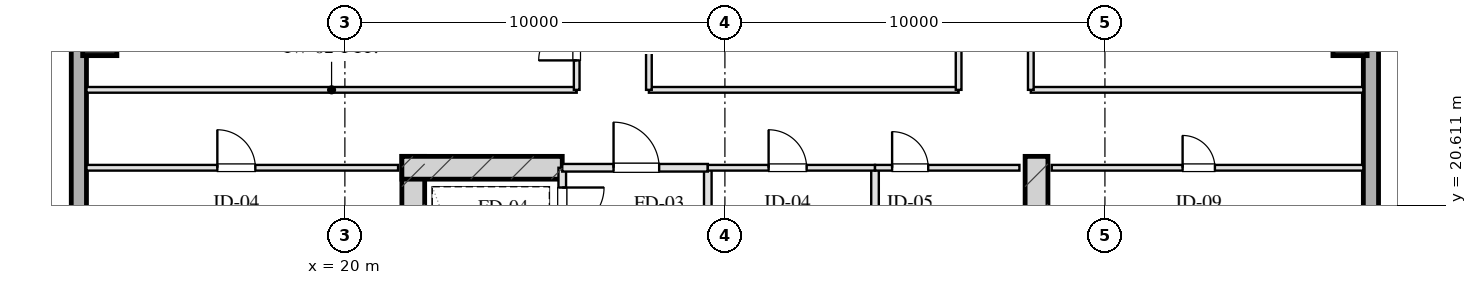
"""IFC4 building model, lengths in metres.
Left out: names, types, materials, properties, quantities, classifications, styles, units other than length and angle.
Written with IfcOpenShell. Run it as: python <this file> out.ifc"""

import sys

from ifc_helpers import new_model, si_unit, direction, frame, frame_2d, origin, origin_2d, place, context, subcontext, project, spatial, rectangle, hollow_rectangle, extrude, element, fill, save


model = new_model("IFC4")
c1 = context("Model", 3, precision=1e-05, world=origin(), true_north=direction((0.0, 1.0)))
c2 = subcontext(c1, "Body", "Model", "MODEL_VIEW")
j1 = project(units=[si_unit("LENGTHUNIT", "METRE"), si_unit("PLANEANGLEUNIT", "RADIAN")], contexts=[c1])
p1 = place(None, origin())
s1 = spatial("IfcSite", under=j1, at=p1, CompositionType="ELEMENT")
p2 = place(p1, origin())
s2 = spatial("IfcBuilding", under=s1, at=p2, CompositionType="ELEMENT")
p3 = place(p2, frame((0.0, 0.0, 180.55)))
s3 = spatial("IfcBuildingStorey", under=s2, at=p3, CompositionType="ELEMENT", Elevation=180.55)
for number, where, z_axis, x_axis in (
    (1, (21.8, 21.9, 0.0), (0.0, 0.0, 1.0), (0.0, -1.0, 0.0)),
    (2, (38.2, 21.9, 0.0), (0.0, 0.0, 1.0), (0.0, -1.0, 0.0)),
):
    element("IfcWall", number, at=place(p3, frame(where, z_axis=z_axis, x_axis=x_axis)), inside=s3, PredefinedType="SHEAR", context=c2, shape_type="SweptSolid", body=[
        extrude(rectangle(XDim=9.48, YDim=0.6, at=frame_2d((4.74, 0.0))), origin(), (0.0, 0.0, 1.0), 3.45),
    ])
p4 = place(p3, frame((21.5, 21.6, 0.0), z_axis=(0.0, 0.0, 1.0), x_axis=(1.0, 0.0, 0.0)))
e3 = element("IfcWall", 3, at=p4, inside=s3, PredefinedType="SHEAR", context=c2, shape_type="SweptSolid", body=[
    extrude(rectangle(XDim=4.22, YDim=0.6, at=frame_2d((2.11, 0.0))), origin(), (0.0, 0.0, 1.0), 3.45),
])
for number, where, z_axis, x_axis in (
    (4, (13.55, 25.0, 0.0), (0.0, 0.0, 1.0), (1.0, 0.0, 0.0)),
    (5, (46.45, 25.0, 0.0), (0.0, 0.0, 1.0), (1.0, 0.0, 0.0)),
):
    element("IfcColumn", number, at=place(p3, frame(where, z_axis=z_axis, x_axis=x_axis)), inside=s3, PredefinedType="COLUMN", context=c2, shape_type="SweptSolid", body=[
        extrude(hollow_rectangle(XDim=0.9, YDim=0.9, WallThickness=0.032, at=origin_2d()), origin(), (0.0, 0.0, 1.0), 3.451),
    ])
p5 = place(p3, frame((13.0, 10.8, 0.0), z_axis=(0.0, 0.0, 1.0), x_axis=(0.0, 1.0, 0.0)))
e6 = element("IfcWall", 6, at=p5, inside=s3, PredefinedType="SOLIDWALL", context=c2, shape_type="SweptSolid", body=[
    extrude(rectangle(XDim=46.4, YDim=0.4, at=frame_2d((23.2, 0.0))), origin(), (0.0, 0.0, 1.0), 2.55),
])
p6 = place(p5, frame((15.75, 0.0, 0.75)))
e7 = element("IfcOpeningElement", 7, at=p6, cuts=e6, PredefinedType="OPENING", context=c2, shape_type="SweptSolid", body=[
    extrude(rectangle(XDim=2.1, YDim=1.4, at=frame_2d((1.05, 0.7))), frame((0.0, 0.21, 0.0), z_axis=(0.0, -1.0, 0.0), x_axis=(1.0, 0.0, 0.0)), (0.0, 0.0, 1.0), 0.42),
])
p7 = place(p5, frame((19.55, 0.0, 0.75)))
e8 = element("IfcOpeningElement", 8, at=p7, cuts=e6, PredefinedType="OPENING", context=c2, shape_type="SweptSolid", body=[
    extrude(rectangle(XDim=2.1, YDim=1.4, at=frame_2d((1.05, 0.7))), frame((0.0, 0.21, 0.0), z_axis=(0.0, -1.0, 0.0), x_axis=(1.0, 0.0, 0.0)), (0.0, 0.0, 1.0), 0.42),
])
p8 = place(p5, frame((24.75, 0.0, 0.75)))
e9 = element("IfcOpeningElement", 9, at=p8, cuts=e6, PredefinedType="OPENING", context=c2, shape_type="SweptSolid", body=[
    extrude(rectangle(XDim=2.1, YDim=1.4, at=frame_2d((1.05, 0.7))), frame((0.0, 0.21, 0.0), z_axis=(0.0, -1.0, 0.0), x_axis=(1.0, 0.0, 0.0)), (0.0, 0.0, 1.0), 0.42),
])
p9 = place(p5, frame((28.55, 0.0, 0.75)))
e10 = element("IfcOpeningElement", 10, at=p9, cuts=e6, PredefinedType="OPENING", context=c2, shape_type="SweptSolid", body=[
    extrude(rectangle(XDim=2.1, YDim=1.4, at=frame_2d((1.05, 0.7))), frame((0.0, 0.21, 0.0), z_axis=(0.0, -1.0, 0.0), x_axis=(1.0, 0.0, 0.0)), (0.0, 0.0, 1.0), 0.42),
])
p10 = place(p3, frame((47.0, 57.2, 0.0), z_axis=(0.0, 0.0, 1.0), x_axis=(0.0, -1.0, 0.0)))
e11 = element("IfcWall", 11, at=p10, inside=s3, PredefinedType="SOLIDWALL", context=c2, shape_type="SweptSolid", body=[
    extrude(rectangle(XDim=46.4, YDim=0.4, at=frame_2d((23.2, 0.0))), origin(), (0.0, 0.0, 1.0), 2.55),
])
p11 = place(p10, frame((28.55, 0.0, 0.75)))
e12 = element("IfcOpeningElement", 12, at=p11, cuts=e11, PredefinedType="OPENING", context=c2, shape_type="SweptSolid", body=[
    extrude(rectangle(XDim=2.1, YDim=1.4, at=frame_2d((1.05, 0.7))), frame((0.0, 0.21, 0.0), z_axis=(0.0, -1.0, 0.0), x_axis=(1.0, 0.0, 0.0)), (0.0, 0.0, 1.0), 0.42),
])
p12 = place(p10, frame((24.75, 0.0, 0.75)))
e13 = element("IfcOpeningElement", 13, at=p12, cuts=e11, PredefinedType="OPENING", context=c2, shape_type="SweptSolid", body=[
    extrude(rectangle(XDim=2.1, YDim=1.4, at=frame_2d((1.05, 0.7))), frame((0.0, 0.21, 0.0), z_axis=(0.0, -1.0, 0.0), x_axis=(1.0, 0.0, 0.0)), (0.0, 0.0, 1.0), 0.42),
])
p13 = place(p10, frame((19.55, 0.0, 0.75)))
e14 = element("IfcOpeningElement", 14, at=p13, cuts=e11, PredefinedType="OPENING", context=c2, shape_type="SweptSolid", body=[
    extrude(rectangle(XDim=2.1, YDim=1.4, at=frame_2d((1.05, 0.7))), frame((0.0, 0.21, 0.0), z_axis=(0.0, -1.0, 0.0), x_axis=(1.0, 0.0, 0.0)), (0.0, 0.0, 1.0), 0.42),
])
p14 = place(p10, frame((15.75, 0.0, 0.75)))
e15 = element("IfcOpeningElement", 15, at=p14, cuts=e11, PredefinedType="OPENING", context=c2, shape_type="SweptSolid", body=[
    extrude(rectangle(XDim=2.1, YDim=1.4, at=frame_2d((1.05, 0.7))), frame((0.0, 0.21, 0.0), z_axis=(0.0, -1.0, 0.0), x_axis=(1.0, 0.0, 0.0)), (0.0, 0.0, 1.0), 0.42),
])
p15 = place(p3, frame((25.72, 21.6, 0.0), z_axis=(0.0, 0.0, 1.0), x_axis=(0.0, -1.0, 0.0)))
e16 = element("IfcWall", 16, at=p15, inside=s3, PredefinedType="PARTITIONING", context=c2, shape_type="SweptSolid", body=[
    extrude(rectangle(XDim=1.9, YDim=0.2, at=frame_2d((0.95, 0.0))), origin(), (0.0, 0.0, 1.0), 3.155),
])
p16 = place(p15, frame((0.52, 0.0, 0.0)))
e17 = element("IfcOpeningElement", 17, at=p16, cuts=e16, PredefinedType="OPENING", context=c2, shape_type="SweptSolid", body=[
    extrude(rectangle(XDim=1.1, YDim=2.05, at=frame_2d((0.55, 1.025))), frame((0.0, 0.11, 0.0), z_axis=(0.0, -1.0, 0.0), x_axis=(1.0, 0.0, 0.0)), (0.0, 0.0, 1.0), 0.22),
])
p17 = place(p3, frame((29.55, 21.6, 0.0), z_axis=(0.0, 0.0, 1.0), x_axis=(0.0, -1.0, 0.0)))
e18 = element("IfcWall", 18, at=p17, inside=s3, PredefinedType="PARTITIONING", context=c2, shape_type="SweptSolid", body=[
    extrude(rectangle(XDim=8.43, YDim=0.2, at=frame_2d((4.215, 0.0))), origin(), (0.0, 0.0, 1.0), 3.155),
])
p18 = place(p3, frame((25.72, 21.6, 0.0), z_axis=(0.0, 0.0, 1.0), x_axis=(1.0, 0.0, 0.0)))
e19 = element("IfcWall", 19, at=p18, inside=s3, PredefinedType="PARTITIONING", context=c2, shape_type="SweptSolid", body=[
    extrude(rectangle(XDim=3.83, YDim=0.2, at=frame_2d((1.915, 0.0))), origin(), (0.0, 0.0, 1.0), 3.155),
])
p19 = place(p18, frame((1.35, 0.0, 0.0)))
e20 = element("IfcOpeningElement", 20, at=p19, cuts=e19, PredefinedType="OPENING", context=c2, shape_type="SweptSolid", body=[
    extrude(rectangle(XDim=1.2, YDim=2.05, at=frame_2d((0.6, 1.025))), frame((0.0, 0.11, 0.0), z_axis=(0.0, -1.0, 0.0), x_axis=(1.0, 0.0, 0.0)), (0.0, 0.0, 1.0), 0.22),
])
p20 = place(p3, frame((33.95, 21.6, 0.0), z_axis=(0.0, 0.0, 1.0), x_axis=(0.0, -1.0, 0.0)))
e21 = element("IfcWall", 21, at=p20, inside=s3, PredefinedType="PARTITIONING", context=c2, shape_type="SweptSolid", body=[
    extrude(rectangle(XDim=8.43, YDim=0.2, at=frame_2d((4.215, 0.0))), origin(), (0.0, 0.0, 1.0), 3.155),
])
p21 = place(p3, frame((29.55, 21.6, 0.0), z_axis=(0.0, 0.0, 1.0), x_axis=(1.0, 0.0, 0.0)))
e22 = element("IfcWall", 22, at=p21, inside=s3, PredefinedType="PARTITIONING", context=c2, shape_type="SweptSolid", body=[
    extrude(rectangle(XDim=4.4, YDim=0.15, at=frame_2d((2.2, 0.0))), origin(), (0.0, 0.0, 1.0), 3.155),
])
p22 = place(p21, frame((1.6, 0.0, 0.0)))
e23 = element("IfcOpeningElement", 23, at=p22, cuts=e22, PredefinedType="OPENING", context=c2, shape_type="SweptSolid", body=[
    extrude(rectangle(XDim=1.0, YDim=2.05, at=frame_2d((0.5, 1.025))), frame((0.0, 0.085, 0.0), z_axis=(0.0, -1.0, 0.0), x_axis=(1.0, 0.0, 0.0)), (0.0, 0.0, 1.0), 0.17),
])
p23 = place(p3, frame((33.95, 21.6, 0.0), z_axis=(0.0, 0.0, 1.0), x_axis=(1.0, 0.0, 0.0)))
e24 = element("IfcWall", 24, at=p23, inside=s3, PredefinedType="PARTITIONING", context=c2, shape_type="SweptSolid", body=[
    extrude(rectangle(XDim=3.8, YDim=0.15, at=frame_2d((1.9, 0.0))), origin(), (0.0, 0.0, 1.0), 3.155),
])
p24 = place(p23, frame((0.45, 0.0, 0.0)))
e25 = element("IfcOpeningElement", 25, at=p24, cuts=e24, PredefinedType="OPENING", context=c2, shape_type="SweptSolid", body=[
    extrude(rectangle(XDim=0.95, YDim=2.05, at=frame_2d((0.475, 1.025))), frame((0.0, 0.085, 0.0), z_axis=(0.0, -1.0, 0.0), x_axis=(1.0, 0.0, 0.0)), (0.0, 0.0, 1.0), 0.17),
])
p25 = place(p3, frame((13.2, 21.6, 0.0), z_axis=(0.0, 0.0, 1.0), x_axis=(1.0, 0.0, 0.0)))
e26 = element("IfcWall", 26, at=p25, inside=s3, PredefinedType="PARTITIONING", context=c2, shape_type="SweptSolid", body=[
    extrude(rectangle(XDim=8.2, YDim=0.15, at=frame_2d((4.1, 0.0))), origin(), (0.0, 0.0, 1.0), 3.155),
])
p26 = place(p25, frame((3.444, 0.0, 0.0)))
e27 = element("IfcOpeningElement", 27, at=p26, cuts=e26, PredefinedType="OPENING", context=c2, shape_type="SweptSolid", body=[
    extrude(rectangle(XDim=1.0, YDim=2.05, at=frame_2d((0.5, 1.025))), frame((0.0, 0.085, 0.0), z_axis=(0.0, -1.0, 0.0), x_axis=(1.0, 0.0, 0.0)), (0.0, 0.0, 1.0), 0.17),
])
p27 = place(p3, frame((38.6, 21.6, 0.0), z_axis=(0.0, 0.0, 1.0), x_axis=(1.0, 0.0, 0.0)))
e28 = element("IfcWall", 28, at=p27, inside=s3, PredefinedType="PARTITIONING", context=c2, shape_type="SweptSolid", body=[
    extrude(rectangle(XDim=8.2, YDim=0.15, at=frame_2d((4.1, 0.0))), origin(), (0.0, 0.0, 1.0), 3.155),
])
p28 = place(p27, frame((3.444, 0.0, 0.0)))
e29 = element("IfcOpeningElement", 29, at=p28, cuts=e28, PredefinedType="OPENING", context=c2, shape_type="SweptSolid", body=[
    extrude(rectangle(XDim=0.85, YDim=2.05, at=frame_2d((0.425, 1.025))), frame((0.0, 0.085, 0.0), z_axis=(0.0, -1.0, 0.0), x_axis=(1.0, 0.0, 0.0)), (0.0, 0.0, 1.0), 0.17),
])
p29 = place(p3, frame((13.2, 23.65, 0.0), z_axis=(0.0, 0.0, 1.0), x_axis=(1.0, 0.0, 0.0)))
e30 = element("IfcWall", 30, at=p29, inside=s3, PredefinedType="PARTITIONING", context=c2, shape_type="SweptSolid", body=[
    extrude(rectangle(XDim=12.9, YDim=0.15, at=frame_2d((6.45, 0.0))), origin(), (0.0, 0.0, 1.0), 3.155),
])
p30 = place(p3, frame((28.0, 23.65, 0.0), z_axis=(0.0, 0.0, 1.0), x_axis=(1.0, 0.0, 0.0)))
e31 = element("IfcWall", 31, at=p30, inside=s3, PredefinedType="PARTITIONING", context=c2, shape_type="SweptSolid", body=[
    extrude(rectangle(XDim=8.15, YDim=0.15, at=frame_2d((4.075, 0.0))), origin(), (0.0, 0.0, 1.0), 3.155),
])
p31 = place(p3, frame((38.05, 23.65, 0.0), z_axis=(0.0, 0.0, 1.0), x_axis=(1.0, 0.0, 0.0)))
e32 = element("IfcWall", 32, at=p31, inside=s3, PredefinedType="PARTITIONING", context=c2, shape_type="SweptSolid", body=[
    extrude(rectangle(XDim=8.75, YDim=0.15, at=frame_2d((4.375, 0.0))), origin(), (0.0, 0.0, 1.0), 3.155),
])
p32 = place(p3, frame((26.1, 23.65, 0.0), z_axis=(0.0, 0.0, 1.0), x_axis=(0.0, 1.0, 0.0)))
e33 = element("IfcWall", 33, at=p32, inside=s3, PredefinedType="PARTITIONING", context=c2, shape_type="SweptSolid", body=[
    extrude(rectangle(XDim=20.7, YDim=0.15, at=frame_2d((10.35, 0.0))), origin(), (0.0, 0.0, 1.0), 3.155),
])
p33 = place(p32, frame((0.775, 0.0, 0.0)))
e34 = element("IfcOpeningElement", 34, at=p33, cuts=e33, PredefinedType="OPENING", context=c2, shape_type="SweptSolid", body=[
    extrude(rectangle(XDim=1.0, YDim=2.05, at=frame_2d((0.5, 1.025))), frame((0.0, 0.085, 0.0), z_axis=(0.0, -1.0, 0.0), x_axis=(1.0, 0.0, 0.0)), (0.0, 0.0, 1.0), 0.17),
])
p34 = place(p32, frame((3.95, 0.0, 0.0)))
e35 = element("IfcOpeningElement", 35, at=p34, cuts=e33, PredefinedType="OPENING", context=c2, shape_type="SweptSolid", body=[
    extrude(rectangle(XDim=1.0, YDim=2.05, at=frame_2d((0.5, 1.025))), frame((0.0, 0.085, 0.0), z_axis=(0.0, -1.0, 0.0), x_axis=(1.0, 0.0, 0.0)), (0.0, 0.0, 1.0), 0.17),
])
p35 = place(p32, frame((7.51, 0.0, 0.0)))
e36 = element("IfcOpeningElement", 36, at=p35, cuts=e33, PredefinedType="OPENING", context=c2, shape_type="SweptSolid", body=[
    extrude(rectangle(XDim=1.05, YDim=2.05, at=frame_2d((0.525, 1.025))), frame((0.0, 0.085, 0.0), z_axis=(0.0, -1.0, 0.0), x_axis=(1.0, 0.0, 0.0)), (0.0, 0.0, 1.0), 0.17),
])
p36 = place(p32, frame((11.51, 0.0, 0.0)))
e37 = element("IfcOpeningElement", 37, at=p36, cuts=e33, PredefinedType="OPENING", context=c2, shape_type="SweptSolid", body=[
    extrude(rectangle(XDim=1.0, YDim=2.05, at=frame_2d((0.5, 1.025))), frame((0.0, 0.085, 0.0), z_axis=(0.0, -1.0, 0.0), x_axis=(1.0, 0.0, 0.0)), (0.0, 0.0, 1.0), 0.17),
])
p37 = place(p32, frame((15.75, 0.0, 0.0)))
e38 = element("IfcOpeningElement", 38, at=p37, cuts=e33, PredefinedType="OPENING", context=c2, shape_type="SweptSolid", body=[
    extrude(rectangle(XDim=1.0, YDim=2.05, at=frame_2d((0.5, 1.025))), frame((0.0, 0.085, 0.0), z_axis=(0.0, -1.0, 0.0), x_axis=(1.0, 0.0, 0.0)), (0.0, 0.0, 1.0), 0.17),
])
p38 = place(p32, frame((18.925, 0.0, 0.0)))
e39 = element("IfcOpeningElement", 39, at=p38, cuts=e33, PredefinedType="OPENING", context=c2, shape_type="SweptSolid", body=[
    extrude(rectangle(XDim=1.0, YDim=2.05, at=frame_2d((0.5, 1.025))), frame((0.0, 0.085, 0.0), z_axis=(0.0, -1.0, 0.0), x_axis=(1.0, 0.0, 0.0)), (0.0, 0.0, 1.0), 0.17),
])
p39 = place(p3, frame((28.0, 23.65, 0.0), z_axis=(0.0, 0.0, 1.0), x_axis=(0.0, 1.0, 0.0)))
e40 = element("IfcWall", 40, at=p39, inside=s3, PredefinedType="PARTITIONING", context=c2, shape_type="SweptSolid", body=[
    extrude(rectangle(XDim=20.7, YDim=0.15, at=frame_2d((10.35, 0.0))), origin(), (0.0, 0.0, 1.0), 3.155),
])
p40 = place(p39, frame((2.857, 0.0, 0.0)))
e41 = element("IfcOpeningElement", 41, at=p40, cuts=e40, PredefinedType="OPENING", context=c2, shape_type="SweptSolid", body=[
    extrude(rectangle(XDim=1.1, YDim=2.05, at=frame_2d((0.55, 1.025))), frame((0.0, 0.085, 0.0), z_axis=(0.0, -1.0, 0.0), x_axis=(1.0, 0.0, 0.0)), (0.0, 0.0, 1.0), 0.17),
])
p41 = place(p39, frame((17.208, 0.0, 0.0)))
e42 = element("IfcOpeningElement", 42, at=p41, cuts=e40, PredefinedType="OPENING", context=c2, shape_type="SweptSolid", body=[
    extrude(rectangle(XDim=1.1, YDim=2.05, at=frame_2d((0.55, 1.025))), frame((0.0, 0.085, 0.0), z_axis=(0.0, -1.0, 0.0), x_axis=(1.0, 0.0, 0.0)), (0.0, 0.0, 1.0), 0.17),
])
p42 = place(p3, frame((36.15, 23.65, 0.0), z_axis=(0.0, 0.0, 1.0), x_axis=(0.0, 1.0, 0.0)))
e43 = element("IfcWall", 43, at=p42, inside=s3, PredefinedType="PARTITIONING", context=c2, shape_type="SweptSolid", body=[
    extrude(rectangle(XDim=20.7, YDim=0.15, at=frame_2d((10.35, 0.0))), origin(), (0.0, 0.0, 1.0), 3.155),
])
p43 = place(p42, frame((9.71, 0.0, 0.0)))
e44 = element("IfcOpeningElement", 44, at=p43, cuts=e43, PredefinedType="OPENING", context=c2, shape_type="SweptSolid", body=[
    extrude(rectangle(XDim=1.1, YDim=2.05, at=frame_2d((0.55, 1.025))), frame((0.0, 0.085, 0.0), z_axis=(0.0, -1.0, 0.0), x_axis=(1.0, 0.0, 0.0)), (0.0, 0.0, 1.0), 0.17),
])
p44 = place(p3, frame((38.05, 23.65, 0.0), z_axis=(0.0, 0.0, 1.0), x_axis=(0.0, 1.0, 0.0)))
e45 = element("IfcWall", 45, at=p44, inside=s3, PredefinedType="PARTITIONING", context=c2, shape_type="SweptSolid", body=[
    extrude(rectangle(XDim=20.7, YDim=0.15, at=frame_2d((10.35, 0.0))), origin(), (0.0, 0.0, 1.0), 3.155),
])
p45 = place(p44, frame((4.148, 0.0, 0.0)))
e46 = element("IfcOpeningElement", 46, at=p45, cuts=e45, PredefinedType="OPENING", context=c2, shape_type="SweptSolid", body=[
    extrude(rectangle(XDim=1.05, YDim=2.05, at=frame_2d((0.525, 1.025))), frame((0.0, 0.085, 0.0), z_axis=(0.0, -1.0, 0.0), x_axis=(1.0, 0.0, 0.0)), (0.0, 0.0, 1.0), 0.17),
])
p46 = place(p44, frame((14.499, 0.0, 0.0)))
e47 = element("IfcOpeningElement", 47, at=p46, cuts=e45, PredefinedType="OPENING", context=c2, shape_type="SweptSolid", body=[
    extrude(rectangle(XDim=1.0, YDim=2.05, at=frame_2d((0.5, 1.025))), frame((0.0, 0.085, 0.0), z_axis=(0.0, -1.0, 0.0), x_axis=(1.0, 0.0, 0.0)), (0.0, 0.0, 1.0), 0.17),
])
p47 = place(p16, origin())
e48 = element("IfcDoor", 48, at=p47, inside=s3, OperationType="SINGLE_SWING_LEFT", PredefinedType="DOOR", context=c2, shape_type="SweptSolid", body=[
    extrude(rectangle(XDim=1.1, YDim=2.05, at=frame_2d((0.55, 1.025))), frame((0.0, 0.025, 0.0), z_axis=(0.0, -1.0, 0.0), x_axis=(1.0, 0.0, 0.0)), (0.0, 0.0, 1.0), 0.05),
])
fill(e17, e48)
p48 = place(p19, origin())
e49 = element("IfcDoor", 49, at=p48, inside=s3, OperationType="SINGLE_SWING_LEFT", PredefinedType="DOOR", context=c2, shape_type="SweptSolid", body=[
    extrude(rectangle(XDim=1.2, YDim=2.05, at=frame_2d((0.6, 1.025))), frame((0.0, 0.025, 0.0), z_axis=(0.0, -1.0, 0.0), x_axis=(1.0, 0.0, 0.0)), (0.0, 0.0, 1.0), 0.05),
])
fill(e20, e49)
p49 = place(p22, origin())
e50 = element("IfcDoor", 50, at=p49, inside=s3, OperationType="SINGLE_SWING_LEFT", PredefinedType="DOOR", context=c2, shape_type="SweptSolid", body=[
    extrude(rectangle(XDim=1.0, YDim=2.05, at=frame_2d((0.5, 1.025))), frame((0.0, 0.025, 0.0), z_axis=(0.0, -1.0, 0.0), x_axis=(1.0, 0.0, 0.0)), (0.0, 0.0, 1.0), 0.05),
])
fill(e23, e50)
p50 = place(p24, origin())
e51 = element("IfcDoor", 51, at=p50, inside=s3, OperationType="SINGLE_SWING_LEFT", PredefinedType="DOOR", context=c2, shape_type="SweptSolid", body=[
    extrude(rectangle(XDim=0.95, YDim=2.05, at=frame_2d((0.475, 1.025))), frame((0.0, 0.025, 0.0), z_axis=(0.0, -1.0, 0.0), x_axis=(1.0, 0.0, 0.0)), (0.0, 0.0, 1.0), 0.05),
])
fill(e25, e51)
p51 = place(p26, origin())
e52 = element("IfcDoor", 52, at=p51, inside=s3, OperationType="SINGLE_SWING_LEFT", PredefinedType="DOOR", context=c2, shape_type="SweptSolid", body=[
    extrude(rectangle(XDim=1.0, YDim=2.05, at=frame_2d((0.5, 1.025))), frame((0.0, 0.025, 0.0), z_axis=(0.0, -1.0, 0.0), x_axis=(1.0, 0.0, 0.0)), (0.0, 0.0, 1.0), 0.05),
])
fill(e27, e52)
p52 = place(p28, origin())
e53 = element("IfcDoor", 53, at=p52, inside=s3, OperationType="SINGLE_SWING_LEFT", PredefinedType="DOOR", context=c2, shape_type="SweptSolid", body=[
    extrude(rectangle(XDim=0.85, YDim=2.05, at=frame_2d((0.425, 1.025))), frame((0.0, 0.025, 0.0), z_axis=(0.0, -1.0, 0.0), x_axis=(1.0, 0.0, 0.0)), (0.0, 0.0, 1.0), 0.05),
])
fill(e29, e53)
p53 = place(p33, origin())
e54 = element("IfcDoor", 54, at=p53, inside=s3, OperationType="SINGLE_SWING_LEFT", PredefinedType="DOOR", context=c2, shape_type="SweptSolid", body=[
    extrude(rectangle(XDim=1.0, YDim=2.05, at=frame_2d((0.5, 1.025))), frame((0.0, 0.025, 0.0), z_axis=(0.0, -1.0, 0.0), x_axis=(1.0, 0.0, 0.0)), (0.0, 0.0, 1.0), 0.05),
])
fill(e34, e54)
save(model, sys.argv[1])
